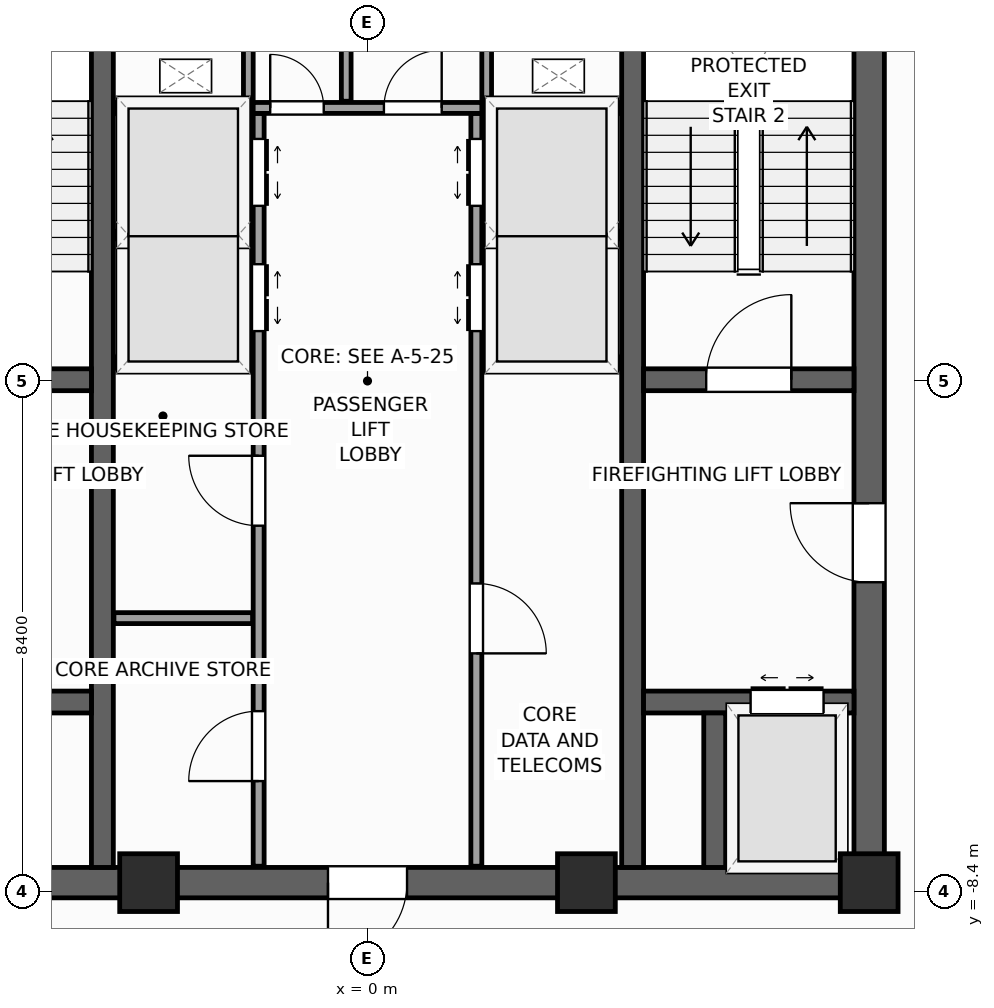
"""IFC4 building model, lengths in metres.
Left out: names, types, materials, properties, quantities, classifications, styles, units other than length and angle.
Written with IfcOpenShell. Run it as: python <this file> out.ifc"""

import sys

from ifc_helpers import new_model, si_unit, direction, frame, frame_2d, origin, origin_2d, place, context, subcontext, project, spatial, rectangle, extrude, source, transform, mapped, element, fill, save


model = new_model("IFC4")
c1 = context("Model", 3, precision=1e-05, world=origin(), true_north=direction((0.0, 1.0)))
c2 = subcontext(c1, "Body", "Model", "MODEL_VIEW")
j1 = project(units=[si_unit("LENGTHUNIT", "METRE"), si_unit("PLANEANGLEUNIT", "RADIAN")], contexts=[c1])
p1 = place(None, origin())
s1 = spatial("IfcSite", under=j1, at=p1, CompositionType="ELEMENT")
p2 = place(p1, origin())
s2 = spatial("IfcBuilding", under=s1, at=p2, CompositionType="ELEMENT")
p3 = place(p2, frame((0.0, 0.0, 244.6)))
s3 = spatial("IfcBuildingStorey", under=s2, at=p3, CompositionType="ELEMENT", Elevation=244.6)
p4 = place(p3, frame((-8.5, -8.25, 0.0), z_axis=(0.0, 0.0, 1.0), x_axis=(1.0, 0.0, 0.0)))
e1 = element("IfcWall", 1, at=p4, inside=s3, PredefinedType="SHEAR", context=c2, shape_type="SweptSolid", body=[
    extrude(rectangle(XDim=17.0, YDim=0.5, at=frame_2d((8.5, 0.0))), origin(), (0.0, 0.0, 1.0), 3.9),
])
p5 = place(p4, frame((7.85, 0.0, 0.0)))
e2 = element("IfcOpeningElement", 2, at=p5, cuts=e1, PredefinedType="OPENING", context=c2, shape_type="SweptSolid", body=[
    extrude(rectangle(XDim=1.3, YDim=2.2, at=frame_2d((0.65, 1.1))), frame((0.0, 0.26, 0.0), z_axis=(0.0, -1.0, 0.0), x_axis=(1.0, 0.0, 0.0)), (0.0, 0.0, 1.0), 0.52),
])
p6 = place(p3, frame((8.25, -8.0, 0.0), z_axis=(0.0, 0.0, 1.0), x_axis=(0.0, 1.0, 0.0)))
e3 = element("IfcWall", 3, at=p6, inside=s3, PredefinedType="SHEAR", context=c2, shape_type="SweptSolid", body=[
    extrude(rectangle(XDim=16.0, YDim=0.5, at=frame_2d((8.0, 0.0))), origin(), (0.0, 0.0, 1.0), 3.9),
])
p7 = place(p6, frame((4.69, 0.0, 0.0)))
e4 = element("IfcOpeningElement", 4, at=p7, cuts=e3, PredefinedType="OPENING", context=c2, shape_type="SweptSolid", body=[
    extrude(rectangle(XDim=1.3, YDim=2.2, at=frame_2d((0.65, 1.1))), frame((0.0, 0.26, 0.0), z_axis=(0.0, -1.0, 0.0), x_axis=(1.0, 0.0, 0.0)), (0.0, 0.0, 1.0), 0.52),
])
for number, where, z_axis, x_axis in (
    (5, (-4.36, -8.0, 0.0), (0.0, 0.0, 1.0), (0.0, 1.0, 0.0)),
    (6, (4.36, -8.0, 0.0), (0.0, 0.0, 1.0), (0.0, 1.0, 0.0)),
):
    element("IfcWall", number, at=place(p3, frame(where, z_axis=z_axis, x_axis=x_axis)), inside=s3, PredefinedType="SHEAR", context=c2, shape_type="SweptSolid", body=[
        extrude(rectangle(XDim=16.0, YDim=0.36, at=frame_2d((8.0, 0.0))), origin(), (0.0, 0.0, 1.0), 3.9),
    ])
p8 = place(p3, frame((-8.0, 0.02, 0.0), z_axis=(0.0, 0.0, 1.0), x_axis=(1.0, 0.0, 0.0)))
e7 = element("IfcWall", 7, at=p8, inside=s3, PredefinedType="SHEAR", context=c2, shape_type="SweptSolid", body=[
    extrude(rectangle(XDim=3.46, YDim=0.36, at=frame_2d((1.73, 0.0))), origin(), (0.0, 0.0, 1.0), 3.9),
])
p9 = place(p8, frame((1.03, 0.0, 0.0)))
e8 = element("IfcOpeningElement", 8, at=p9, cuts=e7, PredefinedType="OPENING", context=c2, shape_type="SweptSolid", body=[
    extrude(rectangle(XDim=1.4, YDim=2.2, at=frame_2d((0.7, 1.1))), frame((0.0, 0.19, 0.0), z_axis=(0.0, -1.0, 0.0), x_axis=(1.0, 0.0, 0.0)), (0.0, 0.0, 1.0), 0.38),
])
p10 = place(p3, frame((4.54, 0.02, 0.0), z_axis=(0.0, 0.0, 1.0), x_axis=(1.0, 0.0, 0.0)))
e9 = element("IfcWall", 9, at=p10, inside=s3, PredefinedType="SHEAR", context=c2, shape_type="SweptSolid", body=[
    extrude(rectangle(XDim=3.46, YDim=0.36, at=frame_2d((1.73, 0.0))), origin(), (0.0, 0.0, 1.0), 3.9),
])
p11 = place(p10, frame((1.03, 0.0, 0.0)))
e10 = element("IfcOpeningElement", 10, at=p11, cuts=e9, PredefinedType="OPENING", context=c2, shape_type="SweptSolid", body=[
    extrude(rectangle(XDim=1.4, YDim=2.2, at=frame_2d((0.7, 1.1))), frame((0.0, 0.19, 0.0), z_axis=(0.0, -1.0, 0.0), x_axis=(1.0, 0.0, 0.0)), (0.0, 0.0, 1.0), 0.38),
])
p12 = place(p3, frame((-8.0, -5.28, 0.0), z_axis=(0.0, 0.0, 1.0), x_axis=(1.0, 0.0, 0.0)))
e11 = element("IfcWall", 11, at=p12, inside=s3, PredefinedType="SHEAR", context=c2, shape_type="SweptSolid", body=[
    extrude(rectangle(XDim=3.46, YDim=0.36, at=frame_2d((1.73, 0.0))), origin(), (0.0, 0.0, 1.0), 3.9),
])
p13 = place(p12, frame((0.5, 0.0, 0.0)))
e12 = element("IfcOpeningElement", 12, at=p13, cuts=e11, PredefinedType="OPENING", context=c2, shape_type="SweptSolid", body=[
    extrude(rectangle(XDim=1.2, YDim=2.25, at=frame_2d((0.6, 1.125))), frame((0.0, 0.19, 0.0), z_axis=(0.0, -1.0, 0.0), x_axis=(1.0, 0.0, 0.0)), (0.0, 0.0, 1.0), 0.38),
])
p14 = place(p3, frame((4.54, -5.28, 0.0), z_axis=(0.0, 0.0, 1.0), x_axis=(1.0, 0.0, 0.0)))
e13 = element("IfcWall", 13, at=p14, inside=s3, PredefinedType="SHEAR", context=c2, shape_type="SweptSolid", body=[
    extrude(rectangle(XDim=3.46, YDim=0.36, at=frame_2d((1.73, 0.0))), origin(), (0.0, 0.0, 1.0), 3.9),
])
p15 = place(p14, frame((1.76, 0.0, 0.0)))
e14 = element("IfcOpeningElement", 14, at=p15, cuts=e13, PredefinedType="OPENING", context=c2, shape_type="SweptSolid", body=[
    extrude(rectangle(XDim=1.2, YDim=2.25, at=frame_2d((0.6, 1.125))), frame((0.0, 0.19, 0.0), z_axis=(0.0, -1.0, 0.0), x_axis=(1.0, 0.0, 0.0)), (0.0, 0.0, 1.0), 0.38),
])
p16 = place(p3, frame((5.71, -8.0, 0.0), z_axis=(0.0, 0.0, 1.0), x_axis=(0.0, 1.0, 0.0)))
e15 = element("IfcWall", 15, at=p16, inside=s3, PredefinedType="SHEAR", context=c2, shape_type="SweptSolid", body=[
    extrude(rectangle(XDim=2.54, YDim=0.36, at=frame_2d((1.27, 0.0))), origin(), (0.0, 0.0, 1.0), 3.9),
])
m1 = source(origin(), c2, "Body", "SweptSolid", [
    extrude(rectangle(XDim=0.95, YDim=0.95, at=origin_2d()), origin(), (0.0, 0.0, 1.0), 3.9),
])
for number, where, z_axis, x_axis in (
    (16, (8.25, -8.25, 0.0), (0.0, 0.0, 1.0), (1.0, 0.0, 0.0)),
    (17, (-3.6, -8.25, 0.0), (0.0, 0.0, 1.0), (1.0, 0.0, 0.0)),
    (18, (3.6, -8.25, 0.0), (0.0, 0.0, 1.0), (1.0, 0.0, 0.0)),
):
    element("IfcColumn", number, at=place(p3, frame(where, z_axis=z_axis, x_axis=x_axis)), inside=s3, PredefinedType="PILASTER", context=c2, shape_type="MappedRepresentation", body=[
        mapped(m1, transform((0.0, 0.0, 0.0), scale=1.0)),
    ])
p17 = place(p3, frame((6.733, -29.154, 0.0), z_axis=(0.0, 0.0, 1.0), x_axis=(0.629325378072, 0.77714192302, 0.0)))
e19 = element("IfcWall", 19, at=p17, inside=s3, PredefinedType="STANDARD", context=c2, shape_type="SweptSolid", body=[
    extrude(rectangle(XDim=36.84, YDim=0.34, at=frame_2d((18.42, 0.0))), origin(), (0.0, 0.0, 1.0), 2.96),
])
p18 = place(p17, frame((23.495, 0.0, 0.0)))
e20 = element("IfcOpeningElement", 20, at=p18, cuts=e19, PredefinedType="OPENING", context=c2, shape_type="SweptSolid", body=[
    extrude(rectangle(XDim=1.05, YDim=2.25, at=frame_2d((0.525, 1.125))), frame((0.0, 0.18, 0.0), z_axis=(0.0, -1.0, 0.0), x_axis=(1.0, 0.0, 0.0)), (0.0, 0.0, 1.0), 0.36),
])
p19 = place(p17, frame((3.721, 0.0, 0.48)))
e21 = element("IfcOpeningElement", 21, at=p19, cuts=e19, PredefinedType="OPENING", context=c2, shape_type="SweptSolid", body=[
    extrude(rectangle(XDim=1.4, YDim=2.4, at=frame_2d((0.7, 1.2))), frame((0.0, 0.18, 0.0), z_axis=(0.0, -1.0, 0.0), x_axis=(1.0, 0.0, 0.0)), (0.0, 0.0, 1.0), 0.36),
])
p20 = place(p17, frame((9.809, 0.0, 0.58)))
e22 = element("IfcOpeningElement", 22, at=p20, cuts=e19, PredefinedType="OPENING", context=c2, shape_type="SweptSolid", body=[
    extrude(rectangle(XDim=1.75, YDim=2.3, at=frame_2d((0.875, 1.15))), frame((0.0, 0.18, 0.0), z_axis=(0.0, -1.0, 0.0), x_axis=(1.0, 0.0, 0.0)), (0.0, 0.0, 1.0), 0.36),
])
p21 = place(p17, frame((16.058, 0.0, 0.58)))
e23 = element("IfcOpeningElement", 23, at=p21, cuts=e19, PredefinedType="OPENING", context=c2, shape_type="SweptSolid", body=[
    extrude(rectangle(XDim=1.75, YDim=2.3, at=frame_2d((0.875, 1.15))), frame((0.0, 0.18, 0.0), z_axis=(0.0, -1.0, 0.0), x_axis=(1.0, 0.0, 0.0)), (0.0, 0.0, 1.0), 0.36),
])
p22 = place(p17, frame((25.676, 0.0, 0.58)))
e24 = element("IfcOpeningElement", 24, at=p22, cuts=e19, PredefinedType="OPENING", context=c2, shape_type="SweptSolid", body=[
    extrude(rectangle(XDim=1.75, YDim=2.3, at=frame_2d((0.875, 1.15))), frame((0.0, 0.18, 0.0), z_axis=(0.0, -1.0, 0.0), x_axis=(1.0, 0.0, 0.0)), (0.0, 0.0, 1.0), 0.36),
])
p23 = place(p17, frame((30.982, 0.0, 0.48)))
e25 = element("IfcOpeningElement", 25, at=p23, cuts=e19, PredefinedType="OPENING", context=c2, shape_type="SweptSolid", body=[
    extrude(rectangle(XDim=1.4, YDim=2.4, at=frame_2d((0.7, 1.2))), frame((0.0, 0.18, 0.0), z_axis=(0.0, -1.0, 0.0), x_axis=(1.0, 0.0, 0.0)), (0.0, 0.0, 1.0), 0.36),
])
p24 = place(p3, frame((-29.154, -6.733, 0.0), z_axis=(0.0, 0.0, 1.0), x_axis=(0.77714192302, -0.629325378072, 0.0)))
e26 = element("IfcWall", 26, at=p24, inside=s3, PredefinedType="STANDARD", context=c2, shape_type="SweptSolid", body=[
    extrude(rectangle(XDim=36.84, YDim=0.34, at=frame_2d((18.42, 0.0))), origin(), (0.0, 0.0, 1.0), 2.96),
])
p25 = place(p24, frame((3.721, 0.0, 0.48)))
e27 = element("IfcOpeningElement", 27, at=p25, cuts=e26, PredefinedType="OPENING", context=c2, shape_type="SweptSolid", body=[
    extrude(rectangle(XDim=1.4, YDim=2.4, at=frame_2d((0.7, 1.2))), frame((0.0, 0.18, 0.0), z_axis=(0.0, -1.0, 0.0), x_axis=(1.0, 0.0, 0.0)), (0.0, 0.0, 1.0), 0.36),
])
p26 = place(p24, frame((9.809, 0.0, 0.58)))
e28 = element("IfcOpeningElement", 28, at=p26, cuts=e26, PredefinedType="OPENING", context=c2, shape_type="SweptSolid", body=[
    extrude(rectangle(XDim=1.75, YDim=2.3, at=frame_2d((0.875, 1.15))), frame((0.0, 0.18, 0.0), z_axis=(0.0, -1.0, 0.0), x_axis=(1.0, 0.0, 0.0)), (0.0, 0.0, 1.0), 0.36),
])
p27 = place(p24, frame((16.058, 0.0, 0.58)))
e29 = element("IfcOpeningElement", 29, at=p27, cuts=e26, PredefinedType="OPENING", context=c2, shape_type="SweptSolid", body=[
    extrude(rectangle(XDim=1.75, YDim=2.3, at=frame_2d((0.875, 1.15))), frame((0.0, 0.18, 0.0), z_axis=(0.0, -1.0, 0.0), x_axis=(1.0, 0.0, 0.0)), (0.0, 0.0, 1.0), 0.36),
])
p28 = place(p24, frame((24.176, 0.0, 0.58)))
e30 = element("IfcOpeningElement", 30, at=p28, cuts=e26, PredefinedType="OPENING", context=c2, shape_type="SweptSolid", body=[
    extrude(rectangle(XDim=1.75, YDim=2.3, at=frame_2d((0.875, 1.15))), frame((0.0, 0.18, 0.0), z_axis=(0.0, -1.0, 0.0), x_axis=(1.0, 0.0, 0.0)), (0.0, 0.0, 1.0), 0.36),
])
p29 = place(p24, frame((30.232, 0.0, 0.48)))
e31 = element("IfcOpeningElement", 31, at=p29, cuts=e26, PredefinedType="OPENING", context=c2, shape_type="SweptSolid", body=[
    extrude(rectangle(XDim=1.4, YDim=2.4, at=frame_2d((0.7, 1.2))), frame((0.0, 0.18, 0.0), z_axis=(0.0, -1.0, 0.0), x_axis=(1.0, 0.0, 0.0)), (0.0, 0.0, 1.0), 0.36),
])
p30 = place(p3, frame((-1.79, -7.98, 0.0), z_axis=(0.0, 0.0, 1.0), x_axis=(0.0, 1.0, 0.0)))
e32 = element("IfcWall", 32, at=p30, inside=s3, PredefinedType="PARTITIONING", context=c2, shape_type="SweptSolid", body=[
    extrude(rectangle(XDim=12.38, YDim=0.18, at=frame_2d((6.19, 0.0))), origin(), (0.0, 0.0, 1.0), 3.66),
])
p31 = place(p30, frame((8.8, 0.0, 0.0)))
e33 = element("IfcOpeningElement", 33, at=p31, cuts=e32, PredefinedType="OPENING", context=c2, shape_type="SweptSolid", body=[
    extrude(rectangle(XDim=1.1, YDim=2.2, at=frame_2d((0.55, 1.1))), frame((0.0, 0.1, 0.0), z_axis=(0.0, -1.0, 0.0), x_axis=(1.0, 0.0, 0.0)), (0.0, 0.0, 1.0), 0.2),
])
p32 = place(p30, frame((10.86, 0.0, 0.0)))
e34 = element("IfcOpeningElement", 34, at=p32, cuts=e32, PredefinedType="OPENING", context=c2, shape_type="SweptSolid", body=[
    extrude(rectangle(XDim=1.1, YDim=2.2, at=frame_2d((0.55, 1.1))), frame((0.0, 0.1, 0.0), z_axis=(0.0, -1.0, 0.0), x_axis=(1.0, 0.0, 0.0)), (0.0, 0.0, 1.0), 0.2),
])
p33 = place(p30, frame((1.4, 0.0, 0.0)))
e35 = element("IfcOpeningElement", 35, at=p33, cuts=e32, PredefinedType="OPENING", context=c2, shape_type="SweptSolid", body=[
    extrude(rectangle(XDim=1.15, YDim=2.25, at=frame_2d((0.575, 1.125))), frame((0.0, 0.1, 0.0), z_axis=(0.0, -1.0, 0.0), x_axis=(1.0, 0.0, 0.0)), (0.0, 0.0, 1.0), 0.2),
])
p34 = place(p30, frame((5.6, 0.0, 0.0)))
e36 = element("IfcOpeningElement", 36, at=p34, cuts=e32, PredefinedType="OPENING", context=c2, shape_type="SweptSolid", body=[
    extrude(rectangle(XDim=1.15, YDim=2.25, at=frame_2d((0.575, 1.125))), frame((0.0, 0.1, 0.0), z_axis=(0.0, -1.0, 0.0), x_axis=(1.0, 0.0, 0.0)), (0.0, 0.0, 1.0), 0.2),
])
p35 = place(p3, frame((1.79, -7.98, 0.0), z_axis=(0.0, 0.0, 1.0), x_axis=(0.0, 1.0, 0.0)))
e37 = element("IfcWall", 37, at=p35, inside=s3, PredefinedType="PARTITIONING", context=c2, shape_type="SweptSolid", body=[
    extrude(rectangle(XDim=12.38, YDim=0.18, at=frame_2d((6.19, 0.0))), origin(), (0.0, 0.0, 1.0), 3.66),
])
p36 = place(p35, frame((8.8, 0.0, 0.0)))
e38 = element("IfcOpeningElement", 38, at=p36, cuts=e37, PredefinedType="OPENING", context=c2, shape_type="SweptSolid", body=[
    extrude(rectangle(XDim=1.1, YDim=2.2, at=frame_2d((0.55, 1.1))), frame((0.0, 0.1, 0.0), z_axis=(0.0, -1.0, 0.0), x_axis=(1.0, 0.0, 0.0)), (0.0, 0.0, 1.0), 0.2),
])
p37 = place(p35, frame((10.86, 0.0, 0.0)))
e39 = element("IfcOpeningElement", 39, at=p37, cuts=e37, PredefinedType="OPENING", context=c2, shape_type="SweptSolid", body=[
    extrude(rectangle(XDim=1.1, YDim=2.2, at=frame_2d((0.55, 1.1))), frame((0.0, 0.1, 0.0), z_axis=(0.0, -1.0, 0.0), x_axis=(1.0, 0.0, 0.0)), (0.0, 0.0, 1.0), 0.2),
])
p38 = place(p35, frame((3.5, 0.0, 0.0)))
e40 = element("IfcOpeningElement", 40, at=p38, cuts=e37, PredefinedType="OPENING", context=c2, shape_type="SweptSolid", body=[
    extrude(rectangle(XDim=1.15, YDim=2.25, at=frame_2d((0.575, 1.125))), frame((0.0, 0.1, 0.0), z_axis=(0.0, -1.0, 0.0), x_axis=(1.0, 0.0, 0.0)), (0.0, 0.0, 1.0), 0.2),
])
p39 = place(p3, frame((-1.88, 4.49, 0.0), z_axis=(0.0, 0.0, 1.0), x_axis=(1.0, 0.0, 0.0)))
e41 = element("IfcWall", 41, at=p39, inside=s3, PredefinedType="PARTITIONING", context=c2, shape_type="SweptSolid", body=[
    extrude(rectangle(XDim=3.76, YDim=0.18, at=frame_2d((1.88, 0.0))), origin(), (0.0, 0.0, 1.0), 3.66),
])
p40 = place(p39, frame((0.28, 0.0, 0.0)))
e42 = element("IfcOpeningElement", 42, at=p40, cuts=e41, PredefinedType="OPENING", context=c2, shape_type="SweptSolid", body=[
    extrude(rectangle(XDim=0.88, YDim=2.1, at=frame_2d((0.44, 1.05))), frame((0.0, 0.1, 0.0), z_axis=(0.0, -1.0, 0.0), x_axis=(1.0, 0.0, 0.0)), (0.0, 0.0, 1.0), 0.2),
])
p41 = place(p39, frame((2.15, 0.0, 0.0)))
e43 = element("IfcOpeningElement", 43, at=p41, cuts=e41, PredefinedType="OPENING", context=c2, shape_type="SweptSolid", body=[
    extrude(rectangle(XDim=0.95, YDim=2.1, at=frame_2d((0.475, 1.05))), frame((0.0, 0.1, 0.0), z_axis=(0.0, -1.0, 0.0), x_axis=(1.0, 0.0, 0.0)), (0.0, 0.0, 1.0), 0.2),
])
for number, where, z_axis, x_axis in (
    (44, (-4.17, -3.9, 0.0), (0.0, 0.0, 1.0), (1.0, 0.0, 0.0)),
    (45, (-4.17, 0.3, 0.0), (0.0, 0.0, 1.0), (1.0, 0.0, 0.0)),
    (46, (1.89, 0.3, 0.0), (0.0, 0.0, 1.0), (1.0, 0.0, 0.0)),
    (47, (-4.17, 4.49, 0.0), (0.0, 0.0, 1.0), (1.0, 0.0, 0.0)),
    (48, (1.89, 4.49, 0.0), (0.0, 0.0, 1.0), (1.0, 0.0, 0.0)),
):
    element("IfcWall", number, at=place(p3, frame(where, z_axis=z_axis, x_axis=x_axis)), inside=s3, PredefinedType="PARTITIONING", context=c2, shape_type="SweptSolid", body=[
        extrude(rectangle(XDim=2.28, YDim=0.18, at=frame_2d((1.14, 0.0))), origin(), (0.0, 0.0, 1.0), 3.66),
    ])
for number, where, z_axis, x_axis in (
    (49, (-4.16, 2.4, 0.0), (0.0, 0.0, 1.0), (1.0, 0.0, 0.0)),
    (50, (1.9, 2.4, 0.0), (0.0, 0.0, 1.0), (1.0, 0.0, 0.0)),
):
    element("IfcWall", number, at=place(p3, frame(where, z_axis=z_axis, x_axis=x_axis)), inside=s3, PredefinedType="PARTITIONING", context=c2, shape_type="SweptSolid", body=[
        extrude(rectangle(XDim=2.26, YDim=0.12, at=frame_2d((1.13, 0.0))), origin(), (0.0, 0.0, 1.0), 3.66),
    ])
for number, where, z_axis, x_axis in (
    (51, (-1.96, 4.58, 0.0), (0.0, 0.0, 1.0), (0.0, 1.0, 0.0)),
    (52, (1.96, 4.58, 0.0), (0.0, 0.0, 1.0), (0.0, 1.0, 0.0)),
):
    element("IfcWall", number, at=place(p3, frame(where, z_axis=z_axis, x_axis=x_axis)), inside=s3, PredefinedType="PARTITIONING", context=c2, shape_type="SweptSolid", body=[
        extrude(rectangle(XDim=3.4, YDim=0.16, at=frame_2d((1.7, 0.0))), origin(), (0.0, 0.0, 1.0), 3.66),
    ])
p42 = place(p3, frame((-0.35, 4.6, 0.0), z_axis=(0.0, 0.0, 1.0), x_axis=(0.0, 1.0, 0.0)))
e53 = element("IfcWall", 53, at=p42, inside=s3, PredefinedType="PARTITIONING", context=c2, shape_type="SweptSolid", body=[
    extrude(rectangle(XDim=3.38, YDim=0.16, at=frame_2d((1.69, 0.0))), origin(), (0.0, 0.0, 1.0), 3.66),
])
m2 = source(origin(), c2, "Body", "SweptSolid", [
    extrude(rectangle(XDim=1.4, YDim=2.2, at=frame_2d((0.7, 1.1))), frame((0.0, 0.025, 0.0), z_axis=(0.0, -1.0, 0.0), x_axis=(1.0, 0.0, 0.0)), (0.0, 0.0, 1.0), 0.05),
])
p43 = place(p11, origin())
e54 = element("IfcDoor", 54, at=p43, inside=s3, OperationType="SINGLE_SWING_RIGHT", PredefinedType="DOOR", context=c2, shape_type="MappedRepresentation", body=[
    mapped(m2, transform((0.0, 0.0, 0.0), scale=1.0)),
])
fill(e10, e54)
m3 = source(origin(), c2, "Body", "SweptSolid", [
    extrude(rectangle(XDim=1.3, YDim=2.2, at=frame_2d((0.65, 1.1))), frame((0.0, 0.025, 0.0), z_axis=(0.0, -1.0, 0.0), x_axis=(1.0, 0.0, 0.0)), (0.0, 0.0, 1.0), 0.05),
])
p44 = place(p7, origin())
e55 = element("IfcDoor", 55, at=p44, inside=s3, OperationType="SINGLE_SWING_RIGHT", PredefinedType="DOOR", context=c2, shape_type="MappedRepresentation", body=[
    mapped(m3, transform((0.0, 0.0, 0.0), scale=1.0)),
])
fill(e4, e55)
p45 = place(p5, frame((1.3, 0.0, 0.0), z_axis=(0.0, 0.0, 1.0), x_axis=(-1.0, 0.0, 0.0)))
e56 = element("IfcDoor", 56, at=p45, inside=s3, OperationType="SINGLE_SWING_LEFT", PredefinedType="DOOR", context=c2, shape_type="MappedRepresentation", body=[
    mapped(m3, transform((0.0, 0.0, 0.0), scale=1.0)),
])
fill(e2, e56)
m4 = source(origin(), c2, "Body", "SweptSolid", [
    extrude(rectangle(XDim=1.2, YDim=2.25, at=frame_2d((0.6, 1.125))), frame((0.0, 0.025, 0.0), z_axis=(0.0, -1.0, 0.0), x_axis=(1.0, 0.0, 0.0)), (0.0, 0.0, 1.0), 0.05),
])
p46 = place(p15, origin())
e57 = element("IfcDoor", 57, at=p46, inside=s3, OperationType="DOUBLE_DOOR_SLIDING", PredefinedType="DOOR", context=c2, shape_type="MappedRepresentation", body=[
    mapped(m4, transform((0.0, 0.0, 0.0), scale=1.0)),
])
fill(e14, e57)
m5 = source(origin(), c2, "Body", "SweptSolid", [
    extrude(rectangle(XDim=1.1, YDim=2.2, at=frame_2d((0.55, 1.1))), frame((0.0, 0.025, 0.0), z_axis=(0.0, -1.0, 0.0), x_axis=(1.0, 0.0, 0.0)), (0.0, 0.0, 1.0), 0.05),
])
p47 = place(p31, frame((1.1, 0.0, 0.0), z_axis=(0.0, 0.0, 1.0), x_axis=(-1.0, 0.0, 0.0)))
e58 = element("IfcDoor", 58, at=p47, inside=s3, OperationType="DOUBLE_DOOR_SLIDING", PredefinedType="DOOR", context=c2, shape_type="MappedRepresentation", body=[
    mapped(m5, transform((0.0, 0.0, 0.0), scale=1.0)),
])
fill(e33, e58)
p48 = place(p32, frame((1.1, 0.0, 0.0), z_axis=(0.0, 0.0, 1.0), x_axis=(-1.0, 0.0, 0.0)))
e59 = element("IfcDoor", 59, at=p48, inside=s3, OperationType="DOUBLE_DOOR_SLIDING", PredefinedType="DOOR", context=c2, shape_type="MappedRepresentation", body=[
    mapped(m5, transform((0.0, 0.0, 0.0), scale=1.0)),
])
fill(e34, e59)
p49 = place(p36, origin())
e60 = element("IfcDoor", 60, at=p49, inside=s3, OperationType="DOUBLE_DOOR_SLIDING", PredefinedType="DOOR", context=c2, shape_type="MappedRepresentation", body=[
    mapped(m5, transform((0.0, 0.0, 0.0), scale=1.0)),
])
fill(e38, e60)
p50 = place(p37, origin())
e61 = element("IfcDoor", 61, at=p50, inside=s3, OperationType="DOUBLE_DOOR_SLIDING", PredefinedType="DOOR", context=c2, shape_type="MappedRepresentation", body=[
    mapped(m5, transform((0.0, 0.0, 0.0), scale=1.0)),
])
fill(e39, e61)
m6 = source(origin(), c2, "Body", "SweptSolid", [
    extrude(rectangle(XDim=1.15, YDim=2.25, at=frame_2d((0.575, 1.125))), frame((0.0, 0.025, 0.0), z_axis=(0.0, -1.0, 0.0), x_axis=(1.0, 0.0, 0.0)), (0.0, 0.0, 1.0), 0.05),
])
p51 = place(p33, origin())
e62 = element("IfcDoor", 62, at=p51, inside=s3, OperationType="SINGLE_SWING_LEFT", PredefinedType="DOOR", context=c2, shape_type="MappedRepresentation", body=[
    mapped(m6, transform((0.0, 0.0, 0.0), scale=1.0)),
])
fill(e35, e62)
p52 = place(p34, origin())
e63 = element("IfcDoor", 63, at=p52, inside=s3, OperationType="SINGLE_SWING_RIGHT", PredefinedType="DOOR", context=c2, shape_type="MappedRepresentation", body=[
    mapped(m6, transform((0.0, 0.0, 0.0), scale=1.0)),
])
fill(e36, e63)
p53 = place(p38, frame((1.15, 0.0, 0.0), z_axis=(0.0, 0.0, 1.0), x_axis=(-1.0, 0.0, 0.0)))
e64 = element("IfcDoor", 64, at=p53, inside=s3, OperationType="SINGLE_SWING_LEFT", PredefinedType="DOOR", context=c2, shape_type="MappedRepresentation", body=[
    mapped(m6, transform((0.0, 0.0, 0.0), scale=1.0)),
])
fill(e40, e64)
m7 = source(origin(), c2, "Body", "SweptSolid", [
    extrude(rectangle(XDim=0.88, YDim=2.1, at=frame_2d((0.44, 1.05))), frame((0.0, 0.025, 0.0), z_axis=(0.0, -1.0, 0.0), x_axis=(1.0, 0.0, 0.0)), (0.0, 0.0, 1.0), 0.05),
])
p54 = place(p40, origin())
e65 = element("IfcDoor", 65, at=p54, inside=s3, OperationType="SINGLE_SWING_LEFT", PredefinedType="DOOR", context=c2, shape_type="MappedRepresentation", body=[
    mapped(m7, transform((0.0, 0.0, 0.0), scale=1.0)),
])
fill(e42, e65)
m8 = source(origin(), c2, "Body", "SweptSolid", [
    extrude(rectangle(XDim=0.95, YDim=2.1, at=frame_2d((0.475, 1.05))), frame((0.0, 0.025, 0.0), z_axis=(0.0, -1.0, 0.0), x_axis=(1.0, 0.0, 0.0)), (0.0, 0.0, 1.0), 0.05),
])
p55 = place(p41, origin())
e66 = element("IfcDoor", 66, at=p55, inside=s3, OperationType="SINGLE_SWING_RIGHT", PredefinedType="DOOR", context=c2, shape_type="MappedRepresentation", body=[
    mapped(m8, transform((0.0, 0.0, 0.0), scale=1.0)),
])
fill(e43, e66)
save(model, sys.argv[1])
